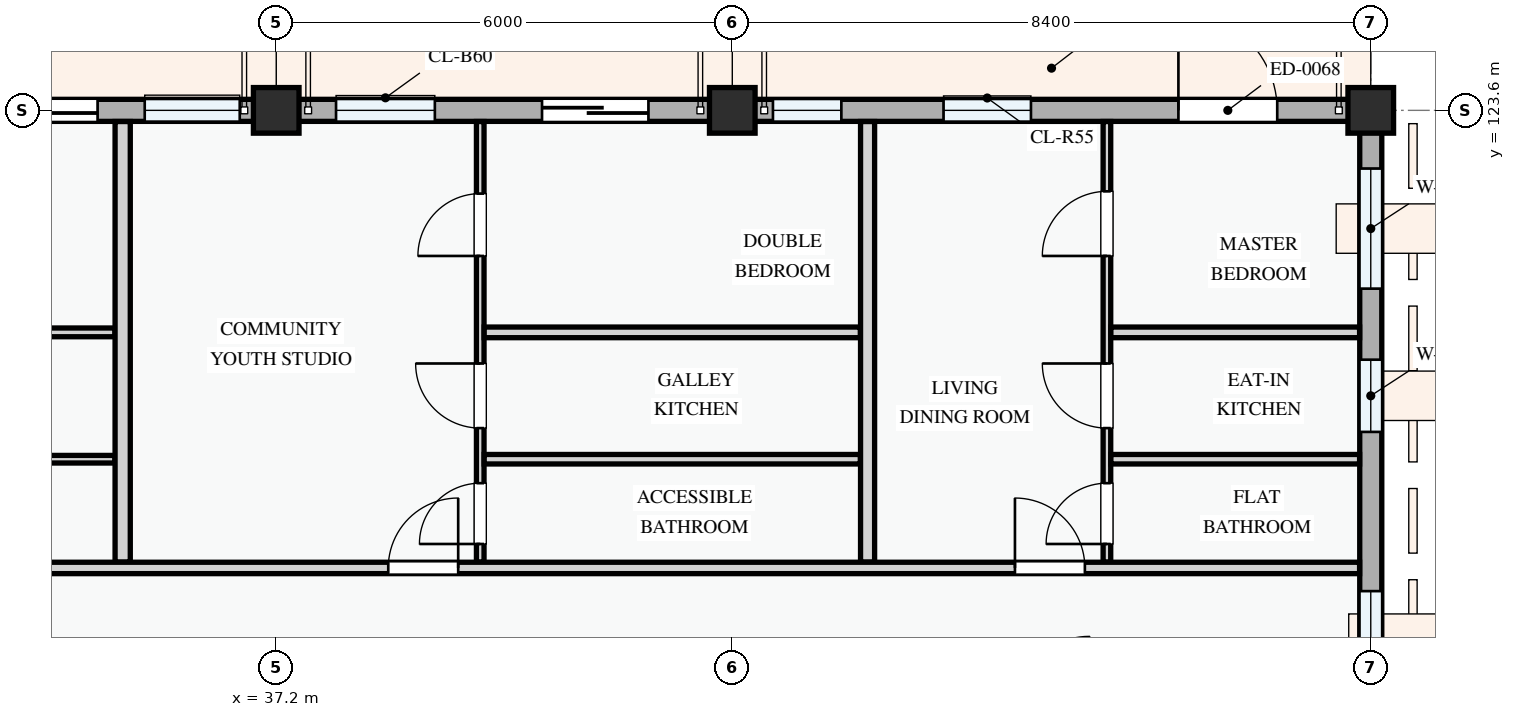
"""IFC4 building model, lengths in metres.
Left out: names, types, materials, properties, quantities, classifications, styles, units other than length and angle.
Written with IfcOpenShell. Run it as: python <this file> out.ifc"""

import sys

from ifc_helpers import new_model, si_unit, direction, frame, frame_2d, origin, origin_2d, place, context, subcontext, project, spatial, rectangle, extrude, element, fill, save


model = new_model("IFC4")
c1 = context("Model", 3, precision=1e-05, world=origin(), true_north=direction((0.0, 1.0)))
c2 = subcontext(c1, "Body", "Model", "MODEL_VIEW")
j1 = project(units=[si_unit("LENGTHUNIT", "METRE"), si_unit("PLANEANGLEUNIT", "RADIAN")], contexts=[c1])
p1 = place(None, origin())
s1 = spatial("IfcSite", under=j1, at=p1, CompositionType="ELEMENT")
p2 = place(p1, origin())
s2 = spatial("IfcBuilding", under=s1, at=p2, CompositionType="ELEMENT")
p3 = place(p2, frame((0.0, 0.0, 27.9)))
s3 = spatial("IfcBuildingStorey", under=s2, at=p3, CompositionType="ELEMENT", Elevation=27.9)
for number, where, z_axis, x_axis in (
    (1, (37.2, 123.6, 0.0), (0.0, 0.0, 1.0), (1.0, 0.0, 0.0)),
    (2, (43.2, 123.6, 0.0), (0.0, 0.0, 1.0), (1.0, 0.0, 0.0)),
    (3, (51.6, 123.6, 0.0), (0.0, 0.0, 1.0), (1.0, 0.0, 0.0)),
):
    element("IfcColumn", number, at=place(p3, frame(where, z_axis=z_axis, x_axis=x_axis)), inside=s3, PredefinedType="COLUMN", context=c2, shape_type="SweptSolid", body=[
        extrude(rectangle(XDim=0.6, YDim=0.6, at=origin_2d()), origin(), (0.0, 0.0, 1.0), 3.3),
    ])
p4 = place(p3, frame((51.6, 115.2, 0.0), z_axis=(0.0, 0.0, 1.0), x_axis=(0.0, 1.0, 0.0)))
e4 = element("IfcWall", 4, at=p4, inside=s3, PredefinedType="STANDARD", context=c2, shape_type="SweptSolid", body=[
    extrude(rectangle(XDim=8.4, YDim=0.29, at=frame_2d((4.2, 0.0))), origin(), (0.0, 0.0, 1.0), 2.425),
])
p5 = place(p4, frame((0.825, 0.0, 0.78)))
e5 = element("IfcOpeningElement", 5, at=p5, cuts=e4, PredefinedType="OPENING", context=c2, shape_type="SweptSolid", body=[
    extrude(rectangle(XDim=1.25, YDim=1.3, at=frame_2d((0.625, 0.65))), frame((0.0, 0.155, 0.0), z_axis=(0.0, -1.0, 0.0), x_axis=(1.0, 0.0, 0.0)), (0.0, 0.0, 1.0), 0.31),
])
p6 = place(p4, frame((4.17, 0.0, 0.78)))
e6 = element("IfcOpeningElement", 6, at=p6, cuts=e4, PredefinedType="OPENING", context=c2, shape_type="SweptSolid", body=[
    extrude(rectangle(XDim=0.95, YDim=1.15, at=frame_2d((0.475, 0.575))), frame((0.0, 0.155, 0.0), z_axis=(0.0, -1.0, 0.0), x_axis=(1.0, 0.0, 0.0)), (0.0, 0.0, 1.0), 0.31),
])
p7 = place(p4, frame((6.055, 0.0, 0.78)))
e7 = element("IfcOpeningElement", 7, at=p7, cuts=e4, PredefinedType="OPENING", context=c2, shape_type="SweptSolid", body=[
    extrude(rectangle(XDim=1.58, YDim=1.48, at=frame_2d((0.79, 0.74))), frame((0.0, 0.155, 0.0), z_axis=(0.0, -1.0, 0.0), x_axis=(1.0, 0.0, 0.0)), (0.0, 0.0, 1.0), 0.31),
])
p8 = place(p3, frame((51.6, 123.6, 0.0), z_axis=(0.0, 0.0, 1.0), x_axis=(-1.0, 0.0, 0.0)))
e8 = element("IfcWall", 8, at=p8, inside=s3, PredefinedType="STANDARD", context=c2, shape_type="SweptSolid", body=[
    extrude(rectangle(XDim=8.4, YDim=0.29, at=frame_2d((4.2, 0.0))), origin(), (0.0, 0.0, 1.0), 2.345),
])
p9 = place(p8, frame((1.231, 0.0, 0.0)))
e9 = element("IfcOpeningElement", 9, at=p9, cuts=e8, PredefinedType="OPENING", context=c2, shape_type="SweptSolid", body=[
    extrude(rectangle(XDim=1.3, YDim=2.15, at=frame_2d((0.65, 1.075))), frame((0.0, 0.155, 0.0), z_axis=(0.0, -1.0, 0.0), x_axis=(1.0, 0.0, 0.0)), (0.0, 0.0, 1.0), 0.31),
])
p10 = place(p8, frame((4.471, 0.0, 0.78)))
e10 = element("IfcOpeningElement", 10, at=p10, cuts=e8, PredefinedType="OPENING", context=c2, shape_type="SweptSolid", body=[
    extrude(rectangle(XDim=1.15, YDim=1.25, at=frame_2d((0.575, 0.625))), frame((0.0, 0.155, 0.0), z_axis=(0.0, -1.0, 0.0), x_axis=(1.0, 0.0, 0.0)), (0.0, 0.0, 1.0), 0.31),
])
p11 = place(p8, frame((6.965, 0.0, 0.78)))
e11 = element("IfcOpeningElement", 11, at=p11, cuts=e8, PredefinedType="OPENING", context=c2, shape_type="SweptSolid", body=[
    extrude(rectangle(XDim=0.9, YDim=1.2, at=frame_2d((0.45, 0.6))), frame((0.0, 0.155, 0.0), z_axis=(0.0, -1.0, 0.0), x_axis=(1.0, 0.0, 0.0)), (0.0, 0.0, 1.0), 0.31),
])
p12 = place(p3, frame((43.2, 123.6, 0.0), z_axis=(0.0, 0.0, 1.0), x_axis=(-1.0, 0.0, 0.0)))
e12 = element("IfcWall", 12, at=p12, inside=s3, PredefinedType="STANDARD", context=c2, shape_type="SweptSolid", body=[
    extrude(rectangle(XDim=6.0, YDim=0.29, at=frame_2d((3.0, 0.0))), origin(), (0.0, 0.0, 1.0), 2.445),
])
p13 = place(p12, frame((1.103, 0.0, 0.0)))
e13 = element("IfcOpeningElement", 13, at=p13, cuts=e12, PredefinedType="OPENING", context=c2, shape_type="SweptSolid", body=[
    extrude(rectangle(XDim=1.4, YDim=2.2, at=frame_2d((0.7, 1.1))), frame((0.0, 0.155, 0.0), z_axis=(0.0, -1.0, 0.0), x_axis=(1.0, 0.0, 0.0)), (0.0, 0.0, 1.0), 0.31),
])
p14 = place(p12, frame((3.913, 0.0, 0.78)))
e14 = element("IfcOpeningElement", 14, at=p14, cuts=e12, PredefinedType="OPENING", context=c2, shape_type="SweptSolid", body=[
    extrude(rectangle(XDim=1.3, YDim=1.4, at=frame_2d((0.65, 0.7))), frame((0.0, 0.155, 0.0), z_axis=(0.0, -1.0, 0.0), x_axis=(1.0, 0.0, 0.0)), (0.0, 0.0, 1.0), 0.31),
])
p15 = place(p3, frame((37.2, 123.6, 0.0), z_axis=(0.0, 0.0, 1.0), x_axis=(-1.0, 0.0, 0.0)))
e15 = element("IfcWall", 15, at=p15, inside=s3, PredefinedType="STANDARD", context=c2, shape_type="SweptSolid", body=[
    extrude(rectangle(XDim=8.4, YDim=0.29, at=frame_2d((4.2, 0.0))), origin(), (0.0, 0.0, 1.0), 2.345),
])
p16 = place(p15, frame((2.35, 0.0, 0.0)))
e16 = element("IfcOpeningElement", 16, at=p16, cuts=e15, PredefinedType="OPENING", context=c2, shape_type="SweptSolid", body=[
    extrude(rectangle(XDim=1.5, YDim=2.2, at=frame_2d((0.75, 1.1))), frame((0.0, 0.155, 0.0), z_axis=(0.0, -1.0, 0.0), x_axis=(1.0, 0.0, 0.0)), (0.0, 0.0, 1.0), 0.31),
])
p17 = place(p15, frame((0.48, 0.0, 0.78)))
e17 = element("IfcOpeningElement", 17, at=p17, cuts=e15, PredefinedType="OPENING", context=c2, shape_type="SweptSolid", body=[
    extrude(rectangle(XDim=1.25, YDim=1.3, at=frame_2d((0.625, 0.65))), frame((0.0, 0.155, 0.0), z_axis=(0.0, -1.0, 0.0), x_axis=(1.0, 0.0, 0.0)), (0.0, 0.0, 1.0), 0.31),
])
p18 = place(p15, frame((4.248, 0.0, 0.78)))
e18 = element("IfcOpeningElement", 18, at=p18, cuts=e15, PredefinedType="OPENING", context=c2, shape_type="SweptSolid", body=[
    extrude(rectangle(XDim=2.04, YDim=1.46, at=frame_2d((1.02, 0.73))), frame((0.0, 0.155, 0.0), z_axis=(0.0, -1.0, 0.0), x_axis=(1.0, 0.0, 0.0)), (0.0, 0.0, 1.0), 0.31),
])
p19 = place(p15, frame((6.948, 0.0, 0.78)))
e19 = element("IfcOpeningElement", 19, at=p19, cuts=e15, PredefinedType="OPENING", context=c2, shape_type="SweptSolid", body=[
    extrude(rectangle(XDim=0.95, YDim=1.15, at=frame_2d((0.475, 0.575))), frame((0.0, 0.155, 0.0), z_axis=(0.0, -1.0, 0.0), x_axis=(1.0, 0.0, 0.0)), (0.0, 0.0, 1.0), 0.31),
])
p20 = place(p3, frame((30.629, 120.679, 0.0), z_axis=(0.0, 0.0, 1.0), x_axis=(1.0, 0.0, 0.0)))
e20 = element("IfcWall", 20, at=p20, inside=s3, PredefinedType="PARTITIONING", context=c2, shape_type="SweptSolid", body=[
    extrude(rectangle(XDim=4.449, YDim=0.115, at=frame_2d((2.225, 0.0))), origin(), (0.0, 0.0, 1.0), 3.0),
])
p21 = place(p3, frame((30.629, 119.01, 0.0), z_axis=(0.0, 0.0, 1.0), x_axis=(1.0, 0.0, 0.0)))
e21 = element("IfcWall", 21, at=p21, inside=s3, PredefinedType="PARTITIONING", context=c2, shape_type="SweptSolid", body=[
    extrude(rectangle(XDim=4.449, YDim=0.1, at=frame_2d((2.225, 0.0))), origin(), (0.0, 0.0, 1.0), 3.0),
])
p22 = place(p3, frame((39.884, 117.657, 0.0), z_axis=(0.0, 0.0, 1.0), x_axis=(0.0, 1.0, 0.0)))
e22 = element("IfcWall", 22, at=p22, inside=s3, PredefinedType="PARTITIONING", context=c2, shape_type="SweptSolid", body=[
    extrude(rectangle(XDim=5.796, YDim=0.1, at=frame_2d((2.898, 0.0))), origin(), (0.0, 0.0, 1.0), 3.0),
])
p23 = place(p22, frame((0.238, 0.0, 0.0)))
e23 = element("IfcOpeningElement", 23, at=p23, cuts=e22, PredefinedType="OPENING", context=c2, shape_type="SweptSolid", body=[
    extrude(rectangle(XDim=0.8, YDim=2.1, at=frame_2d((0.4, 1.05))), frame((0.0, 0.06, 0.0), z_axis=(0.0, -1.0, 0.0), x_axis=(1.0, 0.0, 0.0)), (0.0, 0.0, 1.0), 0.12),
])
p24 = place(p22, frame((1.763, 0.0, 0.0)))
e24 = element("IfcOpeningElement", 24, at=p24, cuts=e22, PredefinedType="OPENING", context=c2, shape_type="SweptSolid", body=[
    extrude(rectangle(XDim=0.85, YDim=2.1, at=frame_2d((0.425, 1.05))), frame((0.0, 0.06, 0.0), z_axis=(0.0, -1.0, 0.0), x_axis=(1.0, 0.0, 0.0)), (0.0, 0.0, 1.0), 0.12),
])
p25 = place(p22, frame((4.028, 0.0, 0.0)))
e25 = element("IfcOpeningElement", 25, at=p25, cuts=e22, PredefinedType="OPENING", context=c2, shape_type="SweptSolid", body=[
    extrude(rectangle(XDim=0.82, YDim=2.08, at=frame_2d((0.41, 1.04))), frame((0.0, 0.06, 0.0), z_axis=(0.0, -1.0, 0.0), x_axis=(1.0, 0.0, 0.0)), (0.0, 0.0, 1.0), 0.12),
])
p26 = place(p3, frame((39.936, 120.679, 0.0), z_axis=(0.0, 0.0, 1.0), x_axis=(1.0, 0.0, 0.0)))
e26 = element("IfcWall", 26, at=p26, inside=s3, PredefinedType="PARTITIONING", context=c2, shape_type="SweptSolid", body=[
    extrude(rectangle(XDim=4.949, YDim=0.14, at=frame_2d((2.475, 0.0))), origin(), (0.0, 0.0, 1.0), 3.0),
])
p27 = place(p3, frame((39.936, 119.01, 0.0), z_axis=(0.0, 0.0, 1.0), x_axis=(1.0, 0.0, 0.0)))
e27 = element("IfcWall", 27, at=p27, inside=s3, PredefinedType="PARTITIONING", context=c2, shape_type="SweptSolid", body=[
    extrude(rectangle(XDim=4.949, YDim=0.125, at=frame_2d((2.475, 0.0))), origin(), (0.0, 0.0, 1.0), 3.0),
])
p28 = place(p3, frame((35.18, 117.657, 0.0), z_axis=(0.0, 0.0, 1.0), x_axis=(0.0, 1.0, 0.0)))
e28 = element("IfcWall", 28, at=p28, inside=s3, PredefinedType="PARTITIONING", context=c2, shape_type="SweptSolid", body=[
    extrude(rectangle(XDim=5.796, YDim=0.2, at=frame_2d((2.898, 0.0))), origin(), (0.0, 0.0, 1.0), 3.0),
])
p29 = place(p3, frame((48.129, 117.657, 0.0), z_axis=(0.0, 0.0, 1.0), x_axis=(0.0, 1.0, 0.0)))
e29 = element("IfcWall", 29, at=p29, inside=s3, PredefinedType="PARTITIONING", context=c2, shape_type="SweptSolid", body=[
    extrude(rectangle(XDim=5.796, YDim=0.1, at=frame_2d((2.898, 0.0))), origin(), (0.0, 0.0, 1.0), 3.0),
])
p30 = place(p29, frame((0.238, 0.0, 0.0)))
e30 = element("IfcOpeningElement", 30, at=p30, cuts=e29, PredefinedType="OPENING", context=c2, shape_type="SweptSolid", body=[
    extrude(rectangle(XDim=0.8, YDim=2.1, at=frame_2d((0.4, 1.05))), frame((0.0, 0.06, 0.0), z_axis=(0.0, -1.0, 0.0), x_axis=(1.0, 0.0, 0.0)), (0.0, 0.0, 1.0), 0.12),
])
p31 = place(p29, frame((1.763, 0.0, 0.0)))
e31 = element("IfcOpeningElement", 31, at=p31, cuts=e29, PredefinedType="OPENING", context=c2, shape_type="SweptSolid", body=[
    extrude(rectangle(XDim=0.85, YDim=2.1, at=frame_2d((0.425, 1.05))), frame((0.0, 0.06, 0.0), z_axis=(0.0, -1.0, 0.0), x_axis=(1.0, 0.0, 0.0)), (0.0, 0.0, 1.0), 0.12),
])
p32 = place(p29, frame((4.028, 0.0, 0.0)))
e32 = element("IfcOpeningElement", 32, at=p32, cuts=e29, PredefinedType="OPENING", context=c2, shape_type="SweptSolid", body=[
    extrude(rectangle(XDim=0.85, YDim=2.1, at=frame_2d((0.425, 1.05))), frame((0.0, 0.06, 0.0), z_axis=(0.0, -1.0, 0.0), x_axis=(1.0, 0.0, 0.0)), (0.0, 0.0, 1.0), 0.12),
])
p33 = place(p3, frame((48.181, 120.679, 0.0), z_axis=(0.0, 0.0, 1.0), x_axis=(1.0, 0.0, 0.0)))
e33 = element("IfcWall", 33, at=p33, inside=s3, PredefinedType="PARTITIONING", context=c2, shape_type="SweptSolid", body=[
    extrude(rectangle(XDim=3.272, YDim=0.14, at=frame_2d((1.636, 0.0))), origin(), (0.0, 0.0, 1.0), 3.0),
])
p34 = place(p3, frame((48.181, 119.01, 0.0), z_axis=(0.0, 0.0, 1.0), x_axis=(1.0, 0.0, 0.0)))
e34 = element("IfcWall", 34, at=p34, inside=s3, PredefinedType="PARTITIONING", context=c2, shape_type="SweptSolid", body=[
    extrude(rectangle(XDim=3.272, YDim=0.125, at=frame_2d((1.636, 0.0))), origin(), (0.0, 0.0, 1.0), 3.0),
])
p35 = place(p3, frame((44.98, 117.657, 0.0), z_axis=(0.0, 0.0, 1.0), x_axis=(0.0, 1.0, 0.0)))
e35 = element("IfcWall", 35, at=p35, inside=s3, PredefinedType="PARTITIONING", context=c2, shape_type="SweptSolid", body=[
    extrude(rectangle(XDim=5.796, YDim=0.185, at=frame_2d((2.898, 0.0))), origin(), (0.0, 0.0, 1.0), 3.0),
])
p36 = place(p3, frame((22.66, 117.58, 0.0), z_axis=(0.0, 0.0, 1.0), x_axis=(1.0, 0.0, 0.0)))
e36 = element("IfcWall", 36, at=p36, inside=s3, PredefinedType="PARTITIONING", context=c2, shape_type="SweptSolid", body=[
    extrude(rectangle(XDim=28.793, YDim=0.15, at=frame_2d((14.396, 0.0))), origin(), (0.0, 0.0, 1.0), 3.0),
])
p37 = place(p36, frame((2.74, 0.0, 0.0)))
e37 = element("IfcOpeningElement", 37, at=p37, cuts=e36, PredefinedType="OPENING", context=c2, shape_type="SweptSolid", body=[
    extrude(rectangle(XDim=0.92, YDim=2.1, at=frame_2d((0.46, 1.05))), frame((0.0, 0.085, 0.0), z_axis=(0.0, -1.0, 0.0), x_axis=(1.0, 0.0, 0.0)), (0.0, 0.0, 1.0), 0.17),
])
p38 = place(p36, frame((16.014, 0.0, 0.0)))
e38 = element("IfcOpeningElement", 38, at=p38, cuts=e36, PredefinedType="OPENING", context=c2, shape_type="SweptSolid", body=[
    extrude(rectangle(XDim=0.92, YDim=2.1, at=frame_2d((0.46, 1.05))), frame((0.0, 0.085, 0.0), z_axis=(0.0, -1.0, 0.0), x_axis=(1.0, 0.0, 0.0)), (0.0, 0.0, 1.0), 0.17),
])
p39 = place(p36, frame((24.259, 0.0, 0.0)))
e39 = element("IfcOpeningElement", 39, at=p39, cuts=e36, PredefinedType="OPENING", context=c2, shape_type="SweptSolid", body=[
    extrude(rectangle(XDim=0.92, YDim=2.1, at=frame_2d((0.46, 1.05))), frame((0.0, 0.085, 0.0), z_axis=(0.0, -1.0, 0.0), x_axis=(1.0, 0.0, 0.0)), (0.0, 0.0, 1.0), 0.17),
])
p40 = place(p5, origin())
e40 = element("IfcWindow", 40, at=p40, inside=s3, PartitioningType="SINGLE_PANEL", PredefinedType="WINDOW", context=c2, shape_type="SweptSolid", body=[
    extrude(rectangle(XDim=1.25, YDim=1.3, at=frame_2d((0.625, 0.65))), frame((0.0, 0.03, 0.0), z_axis=(0.0, -1.0, 0.0), x_axis=(1.0, 0.0, 0.0)), (0.0, 0.0, 1.0), 0.06),
])
fill(e5, e40)
p41 = place(p6, origin())
e41 = element("IfcWindow", 41, at=p41, inside=s3, PartitioningType="SINGLE_PANEL", PredefinedType="WINDOW", context=c2, shape_type="SweptSolid", body=[
    extrude(rectangle(XDim=0.95, YDim=1.15, at=frame_2d((0.475, 0.575))), frame((0.0, 0.03, 0.0), z_axis=(0.0, -1.0, 0.0), x_axis=(1.0, 0.0, 0.0)), (0.0, 0.0, 1.0), 0.06),
])
fill(e6, e41)
p42 = place(p7, origin())
e42 = element("IfcWindow", 42, at=p42, inside=s3, PartitioningType="SINGLE_PANEL", PredefinedType="WINDOW", context=c2, shape_type="SweptSolid", body=[
    extrude(rectangle(XDim=1.58, YDim=1.48, at=frame_2d((0.79, 0.74))), frame((0.0, 0.03, 0.0), z_axis=(0.0, -1.0, 0.0), x_axis=(1.0, 0.0, 0.0)), (0.0, 0.0, 1.0), 0.06),
])
fill(e7, e42)
p43 = place(p9, frame((1.3, 0.0, 0.0), z_axis=(0.0, 0.0, 1.0), x_axis=(-1.0, 0.0, 0.0)))
e43 = element("IfcDoor", 43, at=p43, inside=s3, OperationType="SINGLE_SWING_LEFT", PredefinedType="DOOR", context=c2, shape_type="SweptSolid", body=[
    extrude(rectangle(XDim=1.3, YDim=2.15, at=frame_2d((0.65, 1.075))), frame((0.0, 0.025, 0.0), z_axis=(0.0, -1.0, 0.0), x_axis=(1.0, 0.0, 0.0)), (0.0, 0.0, 1.0), 0.05),
])
fill(e9, e43)
p44 = place(p10, origin())
e44 = element("IfcWindow", 44, at=p44, inside=s3, PartitioningType="SINGLE_PANEL", PredefinedType="WINDOW", context=c2, shape_type="SweptSolid", body=[
    extrude(rectangle(XDim=1.15, YDim=1.25, at=frame_2d((0.575, 0.625))), frame((0.0, 0.03, 0.0), z_axis=(0.0, -1.0, 0.0), x_axis=(1.0, 0.0, 0.0)), (0.0, 0.0, 1.0), 0.06),
])
fill(e10, e44)
p45 = place(p11, origin())
e45 = element("IfcWindow", 45, at=p45, inside=s3, PartitioningType="SINGLE_PANEL", PredefinedType="WINDOW", context=c2, shape_type="SweptSolid", body=[
    extrude(rectangle(XDim=0.9, YDim=1.2, at=frame_2d((0.45, 0.6))), frame((0.0, 0.03, 0.0), z_axis=(0.0, -1.0, 0.0), x_axis=(1.0, 0.0, 0.0)), (0.0, 0.0, 1.0), 0.06),
])
fill(e11, e45)
p46 = place(p13, frame((1.4, 0.0, 0.0), z_axis=(0.0, 0.0, 1.0), x_axis=(-1.0, 0.0, 0.0)))
e46 = element("IfcDoor", 46, at=p46, inside=s3, OperationType="SLIDING_TO_LEFT", PredefinedType="DOOR", context=c2, shape_type="SweptSolid", body=[
    extrude(rectangle(XDim=1.4, YDim=2.2, at=frame_2d((0.7, 1.1))), frame((0.0, 0.025, 0.0), z_axis=(0.0, -1.0, 0.0), x_axis=(1.0, 0.0, 0.0)), (0.0, 0.0, 1.0), 0.05),
])
fill(e13, e46)
p47 = place(p14, origin())
e47 = element("IfcWindow", 47, at=p47, inside=s3, PartitioningType="SINGLE_PANEL", PredefinedType="WINDOW", context=c2, shape_type="SweptSolid", body=[
    extrude(rectangle(XDim=1.3, YDim=1.4, at=frame_2d((0.65, 0.7))), frame((0.0, 0.03, 0.0), z_axis=(0.0, -1.0, 0.0), x_axis=(1.0, 0.0, 0.0)), (0.0, 0.0, 1.0), 0.06),
])
fill(e14, e47)
p48 = place(p16, frame((1.5, 0.0, 0.0), z_axis=(0.0, 0.0, 1.0), x_axis=(-1.0, 0.0, 0.0)))
e48 = element("IfcDoor", 48, at=p48, inside=s3, OperationType="SLIDING_TO_RIGHT", PredefinedType="DOOR", context=c2, shape_type="SweptSolid", body=[
    extrude(rectangle(XDim=1.5, YDim=2.2, at=frame_2d((0.75, 1.1))), frame((0.0, 0.025, 0.0), z_axis=(0.0, -1.0, 0.0), x_axis=(1.0, 0.0, 0.0)), (0.0, 0.0, 1.0), 0.05),
])
fill(e16, e48)
p49 = place(p17, origin())
e49 = element("IfcWindow", 49, at=p49, inside=s3, PartitioningType="SINGLE_PANEL", PredefinedType="WINDOW", context=c2, shape_type="SweptSolid", body=[
    extrude(rectangle(XDim=1.25, YDim=1.3, at=frame_2d((0.625, 0.65))), frame((0.0, 0.03, 0.0), z_axis=(0.0, -1.0, 0.0), x_axis=(1.0, 0.0, 0.0)), (0.0, 0.0, 1.0), 0.06),
])
fill(e17, e49)
p50 = place(p23, origin())
e50 = element("IfcDoor", 50, at=p50, inside=s3, OperationType="SINGLE_SWING_LEFT", PredefinedType="DOOR", context=c2, shape_type="SweptSolid", body=[
    extrude(rectangle(XDim=0.8, YDim=2.1, at=frame_2d((0.4, 1.05))), frame((0.0, 0.025, 0.0), z_axis=(0.0, -1.0, 0.0), x_axis=(1.0, 0.0, 0.0)), (0.0, 0.0, 1.0), 0.05),
])
fill(e23, e50)
p51 = place(p24, origin())
e51 = element("IfcDoor", 51, at=p51, inside=s3, OperationType="SINGLE_SWING_RIGHT", PredefinedType="DOOR", context=c2, shape_type="SweptSolid", body=[
    extrude(rectangle(XDim=0.85, YDim=2.1, at=frame_2d((0.425, 1.05))), frame((0.0, 0.025, 0.0), z_axis=(0.0, -1.0, 0.0), x_axis=(1.0, 0.0, 0.0)), (0.0, 0.0, 1.0), 0.05),
])
fill(e24, e51)
p52 = place(p25, origin())
e52 = element("IfcDoor", 52, at=p52, inside=s3, OperationType="SINGLE_SWING_LEFT", PredefinedType="DOOR", context=c2, shape_type="SweptSolid", body=[
    extrude(rectangle(XDim=0.82, YDim=2.08, at=frame_2d((0.41, 1.04))), frame((0.0, 0.025, 0.0), z_axis=(0.0, -1.0, 0.0), x_axis=(1.0, 0.0, 0.0)), (0.0, 0.0, 1.0), 0.05),
])
fill(e25, e52)
p53 = place(p30, origin())
e53 = element("IfcDoor", 53, at=p53, inside=s3, OperationType="SINGLE_SWING_LEFT", PredefinedType="DOOR", context=c2, shape_type="SweptSolid", body=[
    extrude(rectangle(XDim=0.8, YDim=2.1, at=frame_2d((0.4, 1.05))), frame((0.0, 0.025, 0.0), z_axis=(0.0, -1.0, 0.0), x_axis=(1.0, 0.0, 0.0)), (0.0, 0.0, 1.0), 0.05),
])
fill(e30, e53)
p54 = place(p31, origin())
e54 = element("IfcDoor", 54, at=p54, inside=s3, OperationType="SINGLE_SWING_RIGHT", PredefinedType="DOOR", context=c2, shape_type="SweptSolid", body=[
    extrude(rectangle(XDim=0.85, YDim=2.1, at=frame_2d((0.425, 1.05))), frame((0.0, 0.025, 0.0), z_axis=(0.0, -1.0, 0.0), x_axis=(1.0, 0.0, 0.0)), (0.0, 0.0, 1.0), 0.05),
])
fill(e31, e54)
p55 = place(p32, origin())
e55 = element("IfcDoor", 55, at=p55, inside=s3, OperationType="SINGLE_SWING_LEFT", PredefinedType="DOOR", context=c2, shape_type="SweptSolid", body=[
    extrude(rectangle(XDim=0.85, YDim=2.1, at=frame_2d((0.425, 1.05))), frame((0.0, 0.025, 0.0), z_axis=(0.0, -1.0, 0.0), x_axis=(1.0, 0.0, 0.0)), (0.0, 0.0, 1.0), 0.05),
])
fill(e32, e55)
p56 = place(p38, origin())
e56 = element("IfcDoor", 56, at=p56, inside=s3, OperationType="SINGLE_SWING_RIGHT", PredefinedType="DOOR", context=c2, shape_type="SweptSolid", body=[
    extrude(rectangle(XDim=0.92, YDim=2.1, at=frame_2d((0.46, 1.05))), frame((0.0, 0.025, 0.0), z_axis=(0.0, -1.0, 0.0), x_axis=(1.0, 0.0, 0.0)), (0.0, 0.0, 1.0), 0.05),
])
fill(e38, e56)
p57 = place(p39, origin())
e57 = element("IfcDoor", 57, at=p57, inside=s3, OperationType="SINGLE_SWING_LEFT", PredefinedType="DOOR", context=c2, shape_type="SweptSolid", body=[
    extrude(rectangle(XDim=0.92, YDim=2.1, at=frame_2d((0.46, 1.05))), frame((0.0, 0.025, 0.0), z_axis=(0.0, -1.0, 0.0), x_axis=(1.0, 0.0, 0.0)), (0.0, 0.0, 1.0), 0.05),
])
fill(e39, e57)
save(model, sys.argv[1])
